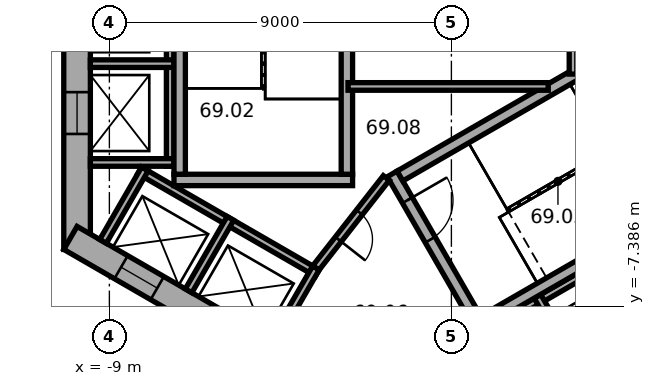
"""IFC4 building model, lengths in metres.
Left out: names, types, materials, properties, quantities, classifications, styles, units other than length and angle.
Written with IfcOpenShell. Run it as: python <this file> out.ifc"""

import sys

from ifc_helpers import new_model, si_unit, direction, frame, frame_2d, origin, place, context, subcontext, project, spatial, rectangle, extrude, element, fill, save


model = new_model("IFC4")
c1 = context("Model", 3, precision=1e-05, world=origin(), true_north=direction((0.0, 1.0)))
c2 = subcontext(c1, "Body", "Model", "MODEL_VIEW")
j1 = project(units=[si_unit("LENGTHUNIT", "METRE"), si_unit("PLANEANGLEUNIT", "RADIAN")], contexts=[c1])
p1 = place(None, origin())
s1 = spatial("IfcSite", under=j1, at=p1, CompositionType="ELEMENT")
p2 = place(p1, origin())
s2 = spatial("IfcBuilding", under=s1, at=p2, CompositionType="ELEMENT")
p3 = place(p2, frame((0.0, 0.0, 278.3)))
s3 = spatial("IfcBuildingStorey", under=s2, at=p3, CompositionType="ELEMENT", Elevation=278.3)
p4 = place(p3, frame((-9.85, 5.889, 0.0), z_axis=(0.0, 0.0, 1.0), x_axis=(0.0, -1.0, 0.0)))
e1 = element("IfcWall", 1, at=p4, inside=s3, PredefinedType="SHEAR", context=c2, shape_type="SweptSolid", body=[
    extrude(rectangle(XDim=11.778, YDim=0.7, at=frame_2d((5.889, 0.0))), origin(), (0.0, 0.0, 1.0), 7.4),
])
p5 = place(p4, frame((5.039, 0.0, 0.0)))
e2 = element("IfcOpeningElement", 2, at=p5, cuts=e1, PredefinedType="OPENING", context=c2, shape_type="SweptSolid", body=[
    extrude(rectangle(XDim=1.1, YDim=2.1, at=frame_2d((0.55, 1.05))), frame((0.0, 0.36, 0.0), z_axis=(0.0, -1.0, 0.0), x_axis=(1.0, 0.0, 0.0)), (0.0, 0.0, 1.0), 0.72),
])
p6 = place(p4, frame((7.639, 0.0, 0.0)))
e3 = element("IfcOpeningElement", 3, at=p6, cuts=e1, PredefinedType="OPENING", context=c2, shape_type="SweptSolid", body=[
    extrude(rectangle(XDim=1.1, YDim=2.1, at=frame_2d((0.55, 1.05))), frame((0.0, 0.36, 0.0), z_axis=(0.0, -1.0, 0.0), x_axis=(1.0, 0.0, 0.0)), (0.0, 0.0, 1.0), 0.72),
])
p7 = place(p3, frame((-10.025, -5.586, 0.0), z_axis=(0.0, 0.0, 1.0), x_axis=(0.866026453023, -0.499998182661, 0.0)))
e4 = element("IfcWall", 4, at=p7, inside=s3, PredefinedType="SHEAR", context=c2, shape_type="SweptSolid", body=[
    extrude(rectangle(XDim=11.778, YDim=0.7, at=frame_2d((5.889, 0.0))), origin(), (0.0, 0.0, 1.0), 7.4),
])
p8 = place(p7, frame((6.089, 0.0, 0.0)))
e5 = element("IfcOpeningElement", 5, at=p8, cuts=e4, PredefinedType="OPENING", context=c2, shape_type="SweptSolid", body=[
    extrude(rectangle(XDim=1.5, YDim=2.1, at=frame_2d((0.75, 1.05))), frame((0.0, 0.36, 0.0), z_axis=(0.0, -1.0, 0.0), x_axis=(1.0, 0.0, 0.0)), (0.0, 0.0, 1.0), 0.72),
])
p9 = place(p7, frame((1.539, 0.0, 0.0)))
e6 = element("IfcOpeningElement", 6, at=p9, cuts=e4, PredefinedType="OPENING", context=c2, shape_type="SweptSolid", body=[
    extrude(rectangle(XDim=1.1, YDim=2.1, at=frame_2d((0.55, 1.05))), frame((0.0, 0.36, 0.0), z_axis=(0.0, -1.0, 0.0), x_axis=(1.0, 0.0, 0.0)), (0.0, 0.0, 1.0), 0.72),
])
p10 = place(p7, frame((4.139, 0.0, 0.0)))
e7 = element("IfcOpeningElement", 7, at=p10, cuts=e4, PredefinedType="OPENING", context=c2, shape_type="SweptSolid", body=[
    extrude(rectangle(XDim=1.1, YDim=2.1, at=frame_2d((0.55, 1.05))), frame((0.0, 0.36, 0.0), z_axis=(0.0, -1.0, 0.0), x_axis=(1.0, 0.0, 0.0)), (0.0, 0.0, 1.0), 0.72),
])
p11 = place(p3, frame((-0.175, -11.475, 0.0), z_axis=(0.0, 0.0, 1.0), x_axis=(0.866026453023, 0.499998182661, 0.0)))
e8 = element("IfcWall", 8, at=p11, inside=s3, PredefinedType="SHEAR", context=c2, shape_type="SweptSolid", body=[
    extrude(rectangle(XDim=11.778, YDim=0.7, at=frame_2d((5.889, 0.0))), origin(), (0.0, 0.0, 1.0), 7.4),
])
p12 = place(p11, frame((2.439, 0.0, 0.0)))
e9 = element("IfcOpeningElement", 9, at=p12, cuts=e8, PredefinedType="OPENING", context=c2, shape_type="SweptSolid", body=[
    extrude(rectangle(XDim=1.1, YDim=2.1, at=frame_2d((0.55, 1.05))), frame((0.0, 0.36, 0.0), z_axis=(0.0, -1.0, 0.0), x_axis=(1.0, 0.0, 0.0)), (0.0, 0.0, 1.0), 0.72),
])
p13 = place(p11, frame((5.039, 0.0, 0.0)))
e10 = element("IfcOpeningElement", 10, at=p13, cuts=e8, PredefinedType="OPENING", context=c2, shape_type="SweptSolid", body=[
    extrude(rectangle(XDim=1.1, YDim=2.1, at=frame_2d((0.55, 1.05))), frame((0.0, 0.36, 0.0), z_axis=(0.0, -1.0, 0.0), x_axis=(1.0, 0.0, 0.0)), (0.0, 0.0, 1.0), 0.72),
])
p14 = place(p11, frame((7.639, 0.0, 0.0)))
e11 = element("IfcOpeningElement", 11, at=p14, cuts=e8, PredefinedType="OPENING", context=c2, shape_type="SweptSolid", body=[
    extrude(rectangle(XDim=1.1, YDim=2.1, at=frame_2d((0.55, 1.05))), frame((0.0, 0.36, 0.0), z_axis=(0.0, -1.0, 0.0), x_axis=(1.0, 0.0, 0.0)), (0.0, 0.0, 1.0), 0.72),
])
p15 = place(p3, frame((-7.4, 4.3, 0.0), z_axis=(0.0, 0.0, 1.0), x_axis=(0.0, -1.0, 0.0)))
e12 = element("IfcWall", 12, at=p15, inside=s3, PredefinedType="PARTITIONING", context=c2, shape_type="SweptSolid", body=[
    extrude(rectangle(XDim=8.0, YDim=0.2, at=frame_2d((4.0, 0.0))), origin(), (0.0, 0.0, 1.0), 7.12),
])
for number, where, z_axis, x_axis in (
    (13, (-7.3, -1.0, 0.0), (0.0, 0.0, 1.0), (-1.0, 0.0, 0.0)),
    (14, (-7.3, -3.6, 0.0), (0.0, 0.0, 1.0), (-1.0, 0.0, 0.0)),
):
    element("IfcWall", number, at=place(p3, frame(where, z_axis=z_axis, x_axis=x_axis)), inside=s3, PredefinedType="PARTITIONING", context=c2, shape_type="SweptSolid", body=[
        extrude(rectangle(XDim=2.2, YDim=0.2, at=frame_2d((1.1, 0.0))), origin(), (0.0, 0.0, 1.0), 7.12),
    ])
p16 = place(p3, frame((-8.203, -3.809, 0.0), z_axis=(0.0, 0.0, 1.0), x_axis=(0.866028230842, -0.499995103361, 0.0)))
e15 = element("IfcWall", 15, at=p16, inside=s3, PredefinedType="PARTITIONING", context=c2, shape_type="SweptSolid", body=[
    extrude(rectangle(XDim=5.4, YDim=0.2, at=frame_2d((2.7, 0.0))), origin(), (0.0, 0.0, 1.0), 7.12),
])
for number, where, z_axis, x_axis in (
    (16, (-8.067, -3.772, 0.0), (0.0, 0.0, 1.0), (-0.5, -0.866, 0.0)),
    (17, (-5.815, -5.072, 0.0), (0.0, 0.0, 1.0), (-0.5, -0.866, 0.0)),
):
    element("IfcWall", number, at=place(p3, frame(where, z_axis=z_axis, x_axis=x_axis)), inside=s3, PredefinedType="PARTITIONING", context=c2, shape_type="SweptSolid", body=[
        extrude(rectangle(XDim=2.2, YDim=0.2, at=frame_2d((1.1, 0.0))), origin(), (0.0, 0.0, 1.0), 7.12),
    ])
p17 = place(p3, frame((-3.563, -6.372, 0.0), z_axis=(0.0, 0.0, 1.0), x_axis=(-0.499994660107, -0.866028486751, 0.0)))
e18 = element("IfcWall", 18, at=p17, inside=s3, PredefinedType="PARTITIONING", context=c2, shape_type="SweptSolid", body=[
    extrude(rectangle(XDim=2.2, YDim=0.2, at=frame_2d((1.1, 0.0))), origin(), (0.0, 0.0, 1.0), 7.12),
])
p18 = place(p3, frame((-0.024, -8.559, 0.0), z_axis=(0.0, 0.0, 1.0), x_axis=(0.866026010844, 0.49999894854, 0.0)))
e19 = element("IfcWall", 19, at=p18, inside=s3, PredefinedType="PARTITIONING", context=c2, shape_type="SweptSolid", body=[
    extrude(rectangle(XDim=8.0, YDim=0.2, at=frame_2d((4.0, 0.0))), origin(), (0.0, 0.0, 1.0), 7.12),
])
p19 = place(p3, frame((2.264, -7.122, 0.0), z_axis=(0.0, 0.0, 1.0), x_axis=(0.500077893725, -0.86598042715, 0.0)))
e20 = element("IfcWall", 20, at=p19, inside=s3, PredefinedType="PARTITIONING", context=c2, shape_type="SweptSolid", body=[
    extrude(rectangle(XDim=2.2, YDim=0.2, at=frame_2d((1.1, 0.0))), origin(), (0.0, 0.0, 1.0), 7.12),
])
p20 = place(p3, frame((-2.6, -4.06, 0.0), z_axis=(0.0, 0.0, 1.0), x_axis=(-1.0, 0.0, 0.0)))
e21 = element("IfcWall", 21, at=p20, inside=s3, PredefinedType="SHEAR", context=c2, shape_type="SweptSolid", body=[
    extrude(rectangle(XDim=4.7, YDim=0.3, at=frame_2d((2.35, 0.0))), origin(), (0.0, 0.0, 1.0), 7.12),
])
for number, where, z_axis, x_axis in (
    (22, (-2.75, 3.15, 0.0), (0.0, 0.0, 1.0), (0.0, -1.0, 0.0)),
    (23, (-7.15, 3.15, 0.0), (0.0, 0.0, 1.0), (0.0, -1.0, 0.0)),
):
    element("IfcWall", number, at=place(p3, frame(where, z_axis=z_axis, x_axis=x_axis)), inside=s3, PredefinedType="SHEAR", context=c2, shape_type="SweptSolid", body=[
        extrude(rectangle(XDim=7.06, YDim=0.3, at=frame_2d((3.53, 0.0))), origin(), (0.0, 0.0, 1.0), 7.12),
    ])
p21 = place(p3, frame((-1.558, -3.902, 0.0), z_axis=(0.0, 0.0, 1.0), x_axis=(0.499977259774, -0.866038532462, 0.0)))
e24 = element("IfcWall", 24, at=p21, inside=s3, PredefinedType="SHEAR", context=c2, shape_type="SweptSolid", body=[
    extrude(rectangle(XDim=4.7, YDim=0.3, at=frame_2d((2.35, 0.0))), origin(), (0.0, 0.0, 1.0), 7.12),
])
p22 = place(p21, frame((0.8, 0.0, 0.0)))
e25 = element("IfcOpeningElement", 25, at=p22, cuts=e24, PredefinedType="OPENING", context=c2, shape_type="SweptSolid", body=[
    extrude(rectangle(XDim=1.2, YDim=2.1, at=frame_2d((0.6, 1.05))), frame((0.0, 0.16, 0.0), z_axis=(0.0, -1.0, 0.0), x_axis=(1.0, 0.0, 0.0)), (0.0, 0.0, 1.0), 0.32),
])
for number, where, z_axis, x_axis in (
    (26, (-1.353, -3.957, 0.0), (0.0, 0.0, 1.0), (0.866, 0.5, 0.0)),
    (27, (0.847, -7.767, 0.0), (0.0, 0.0, 1.0), (0.866, 0.5, 0.0)),
):
    element("IfcWall", number, at=place(p3, frame(where, z_axis=z_axis, x_axis=x_axis)), inside=s3, PredefinedType="SHEAR", context=c2, shape_type="SweptSolid", body=[
        extrude(rectangle(XDim=7.06, YDim=0.3, at=frame_2d((3.53, 0.0))), origin(), (0.0, 0.0, 1.0), 7.12),
    ])
p23 = place(p3, frame((-1.712, -4.008, 0.0), z_axis=(0.0, 0.0, 1.0), x_axis=(-0.616549420702, -0.787316208287, 0.0)))
e28 = element("IfcWall", 28, at=p23, inside=s3, PredefinedType="PARTITIONING", context=c2, shape_type="SweptSolid", body=[
    extrude(rectangle(XDim=3.002, YDim=0.2, at=frame_2d((1.501, 0.0))), origin(), (0.0, 0.0, 1.0), 7.12),
])
p24 = place(p23, frame((1.15, 0.0, 0.0)))
e29 = element("IfcOpeningElement", 29, at=p24, cuts=e28, PredefinedType="OPENING", context=c2, shape_type="SweptSolid", body=[
    extrude(rectangle(XDim=0.9, YDim=2.1, at=frame_2d((0.45, 1.05))), frame((0.0, 0.11, 0.0), z_axis=(0.0, -1.0, 0.0), x_axis=(1.0, 0.0, 0.0)), (0.0, 0.0, 1.0), 0.22),
])
p25 = place(p3, frame((-2.72, -1.6, 0.0), z_axis=(0.0, 0.0, 1.0), x_axis=(1.0, 0.0, 0.0)))
e30 = element("IfcWall", 30, at=p25, inside=s3, PredefinedType="PARTITIONING", context=c2, shape_type="SweptSolid", body=[
    extrude(rectangle(XDim=5.269, YDim=0.2, at=frame_2d((2.634, 0.0))), origin(), (0.0, 0.0, 1.0), 7.12),
])
p26 = place(p3, frame((3.2, -1.275, 0.0), z_axis=(0.0, 0.0, 1.0), x_axis=(0.0, 1.0, 0.0)))
e31 = element("IfcWall", 31, at=p26, inside=s3, PredefinedType="PARTITIONING", context=c2, shape_type="SweptSolid", body=[
    extrude(rectangle(XDim=2.549, YDim=0.2, at=frame_2d((1.275, 0.0))), origin(), (0.0, 0.0, 1.0), 7.12),
])
p27 = place(p22, origin())
e32 = element("IfcDoor", 32, at=p27, inside=s3, OperationType="SINGLE_SWING_RIGHT", PredefinedType="DOOR", context=c2, shape_type="SweptSolid", body=[
    extrude(rectangle(XDim=1.2, YDim=2.1, at=frame_2d((0.6, 1.05))), frame((0.0, 0.025, 0.0), z_axis=(0.0, -1.0, 0.0), x_axis=(1.0, 0.0, 0.0)), (0.0, 0.0, 1.0), 0.05),
])
fill(e25, e32)
p28 = place(p24, origin())
e33 = element("IfcDoor", 33, at=p28, inside=s3, OperationType="SINGLE_SWING_LEFT", PredefinedType="DOOR", context=c2, shape_type="SweptSolid", body=[
    extrude(rectangle(XDim=0.9, YDim=2.1, at=frame_2d((0.45, 1.05))), frame((0.0, 0.025, 0.0), z_axis=(0.0, -1.0, 0.0), x_axis=(1.0, 0.0, 0.0)), (0.0, 0.0, 1.0), 0.05),
])
fill(e29, e33)
p29 = place(p6, origin())
e34 = element("IfcDoor", 34, at=p29, inside=s3, OperationType="DOUBLE_DOOR_SLIDING", PredefinedType="DOOR", context=c2, shape_type="SweptSolid", body=[
    extrude(rectangle(XDim=1.1, YDim=2.1, at=frame_2d((0.55, 1.05))), frame((0.0, 0.025, 0.0), z_axis=(0.0, -1.0, 0.0), x_axis=(1.0, 0.0, 0.0)), (0.0, 0.0, 1.0), 0.05),
])
fill(e3, e34)
p30 = place(p9, origin())
e35 = element("IfcDoor", 35, at=p30, inside=s3, OperationType="DOUBLE_DOOR_SLIDING", PredefinedType="DOOR", context=c2, shape_type="SweptSolid", body=[
    extrude(rectangle(XDim=1.1, YDim=2.1, at=frame_2d((0.55, 1.05))), frame((0.0, 0.025, 0.0), z_axis=(0.0, -1.0, 0.0), x_axis=(1.0, 0.0, 0.0)), (0.0, 0.0, 1.0), 0.05),
])
fill(e6, e35)
save(model, sys.argv[1])
